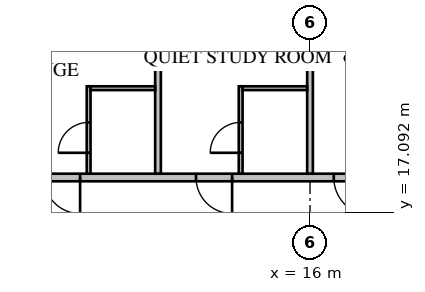
"""IFC4 building model, lengths in metres.
Left out: names, types, materials, properties, quantities, classifications, styles, units other than length and angle.
Written with IfcOpenShell. Run it as: python <this file> out.ifc"""

import sys

from ifc_helpers import new_model, si_unit, direction, frame, frame_2d, origin, place, context, subcontext, project, spatial, rectangle, extrude, element, fill, save


model = new_model("IFC4")
c1 = context("Model", 3, precision=1e-05, world=origin(), true_north=direction((0.0, 1.0)))
c2 = subcontext(c1, "Body", "Model", "MODEL_VIEW")
j1 = project(units=[si_unit("LENGTHUNIT", "METRE"), si_unit("PLANEANGLEUNIT", "RADIAN")], contexts=[c1])
p1 = place(None, origin())
s1 = spatial("IfcSite", under=j1, at=p1, CompositionType="ELEMENT")
p2 = place(p1, origin())
s2 = spatial("IfcBuilding", under=s1, at=p2, CompositionType="ELEMENT")
p3 = place(p2, frame((0.0, 0.0, 16.0)))
s3 = spatial("IfcBuildingStorey", under=s2, at=p3, CompositionType="ELEMENT", Elevation=16.0)
p4 = place(p3, frame((18.0, 18.0, 0.0), z_axis=(0.0, 0.0, 1.0), x_axis=(-1.0, 0.0, 0.0)))
e1 = element("IfcWall", 1, at=p4, inside=s3, PredefinedType="PARTITIONING", context=c2, shape_type="SweptSolid", body=[
    extrude(rectangle(XDim=36.0, YDim=0.2, at=frame_2d((18.0, 0.0))), origin(), (0.0, 0.0, 1.0), 3.65),
])
p5 = place(p4, frame((0.375, 0.0, 0.0)))
e2 = element("IfcOpeningElement", 2, at=p5, cuts=e1, PredefinedType="OPENING", context=c2, shape_type="SweptSolid", body=[
    extrude(rectangle(XDim=1.0, YDim=2.1, at=frame_2d((0.5, 1.05))), frame((0.0, 0.12, 0.0), z_axis=(0.0, -1.0, 0.0), x_axis=(1.0, 0.0, 0.0)), (0.0, 0.0, 1.0), 0.24),
])
p6 = place(p4, frame((4.05, 0.0, 0.0)))
e3 = element("IfcOpeningElement", 3, at=p6, cuts=e1, PredefinedType="OPENING", context=c2, shape_type="SweptSolid", body=[
    extrude(rectangle(XDim=0.95, YDim=2.1, at=frame_2d((0.475, 1.05))), frame((0.0, 0.12, 0.0), z_axis=(0.0, -1.0, 0.0), x_axis=(1.0, 0.0, 0.0)), (0.0, 0.0, 1.0), 0.24),
])
p7 = place(p4, frame((8.05, 0.0, 0.0)))
e4 = element("IfcOpeningElement", 4, at=p7, cuts=e1, PredefinedType="OPENING", context=c2, shape_type="SweptSolid", body=[
    extrude(rectangle(XDim=0.95, YDim=2.1, at=frame_2d((0.475, 1.05))), frame((0.0, 0.12, 0.0), z_axis=(0.0, -1.0, 0.0), x_axis=(1.0, 0.0, 0.0)), (0.0, 0.0, 1.0), 0.24),
])
p8 = place(p4, frame((20.05, 0.0, 0.0)))
e5 = element("IfcOpeningElement", 5, at=p8, cuts=e1, PredefinedType="OPENING", context=c2, shape_type="SweptSolid", body=[
    extrude(rectangle(XDim=0.95, YDim=2.1, at=frame_2d((0.475, 1.05))), frame((0.0, 0.12, 0.0), z_axis=(0.0, -1.0, 0.0), x_axis=(1.0, 0.0, 0.0)), (0.0, 0.0, 1.0), 0.24),
])
p9 = place(p4, frame((24.05, 0.0, 0.0)))
e6 = element("IfcOpeningElement", 6, at=p9, cuts=e1, PredefinedType="OPENING", context=c2, shape_type="SweptSolid", body=[
    extrude(rectangle(XDim=0.95, YDim=2.1, at=frame_2d((0.475, 1.05))), frame((0.0, 0.12, 0.0), z_axis=(0.0, -1.0, 0.0), x_axis=(1.0, 0.0, 0.0)), (0.0, 0.0, 1.0), 0.24),
])
p10 = place(p4, frame((28.05, 0.0, 0.0)))
e7 = element("IfcOpeningElement", 7, at=p10, cuts=e1, PredefinedType="OPENING", context=c2, shape_type="SweptSolid", body=[
    extrude(rectangle(XDim=0.95, YDim=2.1, at=frame_2d((0.475, 1.05))), frame((0.0, 0.12, 0.0), z_axis=(0.0, -1.0, 0.0), x_axis=(1.0, 0.0, 0.0)), (0.0, 0.0, 1.0), 0.24),
])
p11 = place(p4, frame((32.05, 0.0, 0.0)))
e8 = element("IfcOpeningElement", 8, at=p11, cuts=e1, PredefinedType="OPENING", context=c2, shape_type="SweptSolid", body=[
    extrude(rectangle(XDim=0.95, YDim=2.1, at=frame_2d((0.475, 1.05))), frame((0.0, 0.12, 0.0), z_axis=(0.0, -1.0, 0.0), x_axis=(1.0, 0.0, 0.0)), (0.0, 0.0, 1.0), 0.24),
])
p12 = place(p4, frame((34.375, 0.0, 0.0)))
e9 = element("IfcOpeningElement", 9, at=p12, cuts=e1, PredefinedType="OPENING", context=c2, shape_type="SweptSolid", body=[
    extrude(rectangle(XDim=0.95, YDim=2.1, at=frame_2d((0.475, 1.05))), frame((0.0, 0.12, 0.0), z_axis=(0.0, -1.0, 0.0), x_axis=(1.0, 0.0, 0.0)), (0.0, 0.0, 1.0), 0.24),
])
p13 = place(p4, frame((11.2, 0.0, 0.0)))
e10 = element("IfcOpeningElement", 10, at=p13, cuts=e1, PredefinedType="OPENING", context=c2, shape_type="SweptSolid", body=[
    extrude(rectangle(XDim=1.0, YDim=2.1, at=frame_2d((0.5, 1.05))), frame((0.0, 0.12, 0.0), z_axis=(0.0, -1.0, 0.0), x_axis=(1.0, 0.0, 0.0)), (0.0, 0.0, 1.0), 0.24),
])
p14 = place(p4, frame((15.2, 0.0, 0.0)))
e11 = element("IfcOpeningElement", 11, at=p14, cuts=e1, PredefinedType="OPENING", context=c2, shape_type="SweptSolid", body=[
    extrude(rectangle(XDim=1.0, YDim=2.1, at=frame_2d((0.5, 1.05))), frame((0.0, 0.12, 0.0), z_axis=(0.0, -1.0, 0.0), x_axis=(1.0, 0.0, 0.0)), (0.0, 0.0, 1.0), 0.24),
])
p15 = place(p3, frame((16.0, 18.1, 0.0), z_axis=(0.0, 0.0, 1.0), x_axis=(0.0, 1.0, 0.0)))
e12 = element("IfcWall", 12, at=p15, inside=s3, PredefinedType="PARTITIONING", context=c2, shape_type="SweptSolid", body=[
    extrude(rectangle(XDim=6.589, YDim=0.15, at=frame_2d((3.295, 0.0))), origin(), (0.0, 0.0, 1.0), 3.65),
])
p16 = place(p3, frame((12.0, 18.1, 0.0), z_axis=(0.0, 0.0, 1.0), x_axis=(0.0, 1.0, 0.0)))
e13 = element("IfcWall", 13, at=p16, inside=s3, PredefinedType="PARTITIONING", context=c2, shape_type="SweptSolid", body=[
    extrude(rectangle(XDim=6.6, YDim=0.15, at=frame_2d((3.3, 0.0))), origin(), (0.0, 0.0, 1.0), 3.65),
])
p17 = place(p3, frame((14.175, 18.1, 0.0), z_axis=(0.0, 0.0, 1.0), x_axis=(0.0, 1.0, 0.0)))
e14 = element("IfcWall", 14, at=p17, inside=s3, PredefinedType="PARTITIONING", context=c2, shape_type="SweptSolid", body=[
    extrude(rectangle(XDim=2.3, YDim=0.1, at=frame_2d((1.15, 0.0))), origin(), (0.0, 0.0, 1.0), 3.65),
])
p18 = place(p17, frame((0.55, 0.0, 0.0)))
e15 = element("IfcOpeningElement", 15, at=p18, cuts=e14, PredefinedType="OPENING", context=c2, shape_type="SweptSolid", body=[
    extrude(rectangle(XDim=0.8, YDim=2.1, at=frame_2d((0.4, 1.05))), frame((0.0, 0.07, 0.0), z_axis=(0.0, -1.0, 0.0), x_axis=(1.0, 0.0, 0.0)), (0.0, 0.0, 1.0), 0.14),
])
p19 = place(p3, frame((15.925, 20.35, 0.0), z_axis=(0.0, 0.0, 1.0), x_axis=(-1.0, 0.0, 0.0)))
e16 = element("IfcWall", 16, at=p19, inside=s3, PredefinedType="PARTITIONING", context=c2, shape_type="SweptSolid", body=[
    extrude(rectangle(XDim=1.7, YDim=0.1, at=frame_2d((0.85, 0.0))), origin(), (0.0, 0.0, 1.0), 3.65),
])
p20 = place(p3, frame((10.175, 18.1, 0.0), z_axis=(0.0, 0.0, 1.0), x_axis=(0.0, 1.0, 0.0)))
e17 = element("IfcWall", 17, at=p20, inside=s3, PredefinedType="PARTITIONING", context=c2, shape_type="SweptSolid", body=[
    extrude(rectangle(XDim=2.3, YDim=0.1, at=frame_2d((1.15, 0.0))), origin(), (0.0, 0.0, 1.0), 3.65),
])
p21 = place(p20, frame((0.55, 0.0, 0.0)))
e18 = element("IfcOpeningElement", 18, at=p21, cuts=e17, PredefinedType="OPENING", context=c2, shape_type="SweptSolid", body=[
    extrude(rectangle(XDim=0.8, YDim=2.1, at=frame_2d((0.4, 1.05))), frame((0.0, 0.07, 0.0), z_axis=(0.0, -1.0, 0.0), x_axis=(1.0, 0.0, 0.0)), (0.0, 0.0, 1.0), 0.14),
])
p22 = place(p3, frame((11.925, 20.35, 0.0), z_axis=(0.0, 0.0, 1.0), x_axis=(-1.0, 0.0, 0.0)))
e19 = element("IfcWall", 19, at=p22, inside=s3, PredefinedType="PARTITIONING", context=c2, shape_type="SweptSolid", body=[
    extrude(rectangle(XDim=1.7, YDim=0.1, at=frame_2d((0.85, 0.0))), origin(), (0.0, 0.0, 1.0), 3.65),
])
p23 = place(p5, origin())
e20 = element("IfcDoor", 20, at=p23, inside=s3, OperationType="SINGLE_SWING_LEFT", PredefinedType="DOOR", context=c2, shape_type="SweptSolid", body=[
    extrude(rectangle(XDim=1.0, YDim=2.1, at=frame_2d((0.5, 1.05))), frame((0.0, 0.025, 0.0), z_axis=(0.0, -1.0, 0.0), x_axis=(1.0, 0.0, 0.0)), (0.0, 0.0, 1.0), 0.05),
])
fill(e2, e20)
p24 = place(p6, origin())
e21 = element("IfcDoor", 21, at=p24, inside=s3, OperationType="SINGLE_SWING_LEFT", PredefinedType="DOOR", context=c2, shape_type="SweptSolid", body=[
    extrude(rectangle(XDim=0.95, YDim=2.1, at=frame_2d((0.475, 1.05))), frame((0.0, 0.025, 0.0), z_axis=(0.0, -1.0, 0.0), x_axis=(1.0, 0.0, 0.0)), (0.0, 0.0, 1.0), 0.05),
])
fill(e3, e21)
p25 = place(p18, origin())
e22 = element("IfcDoor", 22, at=p25, inside=s3, OperationType="SINGLE_SWING_LEFT", PredefinedType="DOOR", context=c2, shape_type="SweptSolid", body=[
    extrude(rectangle(XDim=0.8, YDim=2.1, at=frame_2d((0.4, 1.05))), frame((0.0, 0.025, 0.0), z_axis=(0.0, -1.0, 0.0), x_axis=(1.0, 0.0, 0.0)), (0.0, 0.0, 1.0), 0.05),
])
fill(e15, e22)
p26 = place(p7, origin())
e23 = element("IfcDoor", 23, at=p26, inside=s3, OperationType="SINGLE_SWING_LEFT", PredefinedType="DOOR", context=c2, shape_type="SweptSolid", body=[
    extrude(rectangle(XDim=0.95, YDim=2.1, at=frame_2d((0.475, 1.05))), frame((0.0, 0.025, 0.0), z_axis=(0.0, -1.0, 0.0), x_axis=(1.0, 0.0, 0.0)), (0.0, 0.0, 1.0), 0.05),
])
fill(e4, e23)
p27 = place(p21, origin())
e24 = element("IfcDoor", 24, at=p27, inside=s3, OperationType="SINGLE_SWING_LEFT", PredefinedType="DOOR", context=c2, shape_type="SweptSolid", body=[
    extrude(rectangle(XDim=0.8, YDim=2.1, at=frame_2d((0.4, 1.05))), frame((0.0, 0.025, 0.0), z_axis=(0.0, -1.0, 0.0), x_axis=(1.0, 0.0, 0.0)), (0.0, 0.0, 1.0), 0.05),
])
fill(e18, e24)
save(model, sys.argv[1])
